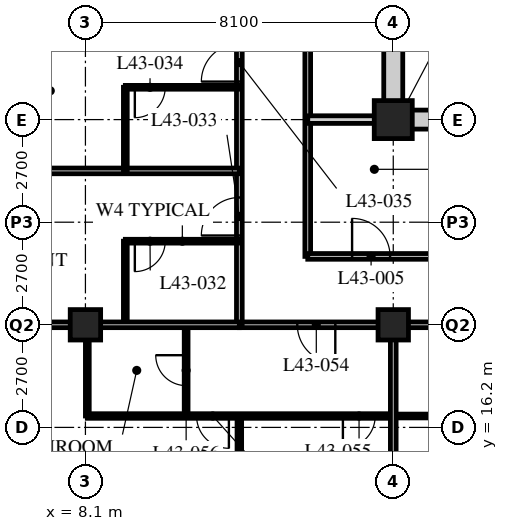
"""IFC4 building model, lengths in metres.
Left out: names, types, materials, properties, quantities, classifications, styles, units other than length and angle.
Written with IfcOpenShell. Run it as: python <this file> out.ifc"""

import sys

from ifc_helpers import new_model, si_unit, direction, frame, frame_2d, origin, origin_2d, place, context, subcontext, project, spatial, rectangle, hollow_rectangle, extrude, element, fill, save


model = new_model("IFC4")
c1 = context("Model", 3, precision=1e-05, world=origin(), true_north=direction((0.0, 1.0)))
c2 = subcontext(c1, "Body", "Model", "MODEL_VIEW")
j1 = project(units=[si_unit("LENGTHUNIT", "METRE"), si_unit("PLANEANGLEUNIT", "RADIAN")], contexts=[c1])
p1 = place(None, origin())
s1 = spatial("IfcSite", under=j1, at=p1, CompositionType="ELEMENT")
p2 = place(p1, origin())
s2 = spatial("IfcBuilding", under=s1, at=p2, CompositionType="ELEMENT")
p3 = place(p2, frame((0.0, 0.0, 170.4)))
s3 = spatial("IfcBuildingStorey", under=s2, at=p3, CompositionType="ELEMENT", Elevation=170.4)
for number, where, z_axis, x_axis in (
    (1, (8.1, 18.9, 0.0), (0.0, 0.0, 1.0), (1.0, 0.0, 0.0)),
    (2, (16.2, 18.9, 0.0), (0.0, 0.0, 1.0), (1.0, 0.0, 0.0)),
):
    element("IfcColumn", number, at=place(p3, frame(where, z_axis=z_axis, x_axis=x_axis)), inside=s3, PredefinedType="COLUMN", context=c2, shape_type="SweptSolid", body=[
        extrude(hollow_rectangle(XDim=0.8, YDim=0.8, WallThickness=0.08, at=origin_2d()), origin(), (0.0, 0.0, 1.0), 3.6),
    ])
p4 = place(p3, frame((16.2, 24.3, 0.0), z_axis=(0.0, 0.0, 1.0), x_axis=(1.0, 0.0, 0.0)))
e3 = element("IfcColumn", 3, at=p4, inside=s3, PredefinedType="COLUMN", context=c2, shape_type="SweptSolid", body=[
    extrude(hollow_rectangle(XDim=1.0, YDim=1.0, WallThickness=0.1, at=origin_2d()), origin(), (0.0, 0.0, 1.0), 3.6),
])
p5 = place(p3, frame((12.15, 18.9, 0.0), z_axis=(0.0, 0.0, 1.0), x_axis=(1.0, 0.0, 0.0)))
e4 = element("IfcWall", 4, at=p5, inside=s3, PredefinedType="PARTITIONING", context=c2, shape_type="SweptSolid", body=[
    extrude(rectangle(XDim=32.4, YDim=0.15, at=frame_2d((16.2, 0.0))), origin(), (0.0, 0.0, 1.0), 2.778),
])
p6 = place(p5, frame((6.4, 0.0, 0.0)))
e5 = element("IfcOpeningElement", 5, at=p6, cuts=e4, PredefinedType="OPENING", context=c2, shape_type="SweptSolid", body=[
    extrude(rectangle(XDim=1.0, YDim=2.1, at=frame_2d((0.5, 1.05))), frame((0.0, 0.085, 0.0), z_axis=(0.0, -1.0, 0.0), x_axis=(1.0, 0.0, 0.0)), (0.0, 0.0, 1.0), 0.17),
])
p7 = place(p5, frame((8.8, 0.0, 0.0)))
e6 = element("IfcOpeningElement", 6, at=p7, cuts=e4, PredefinedType="OPENING", context=c2, shape_type="SweptSolid", body=[
    extrude(rectangle(XDim=1.0, YDim=2.1, at=frame_2d((0.5, 1.05))), frame((0.0, 0.085, 0.0), z_axis=(0.0, -1.0, 0.0), x_axis=(1.0, 0.0, 0.0)), (0.0, 0.0, 1.0), 0.17),
])
p8 = place(p5, frame((13.05, 0.0, 0.0)))
e7 = element("IfcOpeningElement", 7, at=p8, cuts=e4, PredefinedType="OPENING", context=c2, shape_type="SweptSolid", body=[
    extrude(rectangle(XDim=1.0, YDim=2.1, at=frame_2d((0.5, 1.05))), frame((0.0, 0.085, 0.0), z_axis=(0.0, -1.0, 0.0), x_axis=(1.0, 0.0, 0.0)), (0.0, 0.0, 1.0), 0.17),
])
p9 = place(p5, frame((22.6, 0.0, 0.0)))
e8 = element("IfcOpeningElement", 8, at=p9, cuts=e4, PredefinedType="OPENING", context=c2, shape_type="SweptSolid", body=[
    extrude(rectangle(XDim=1.0, YDim=2.1, at=frame_2d((0.5, 1.05))), frame((0.0, 0.085, 0.0), z_axis=(0.0, -1.0, 0.0), x_axis=(1.0, 0.0, 0.0)), (0.0, 0.0, 1.0), 0.17),
])
p10 = place(p5, frame((25.0, 0.0, 0.0)))
e9 = element("IfcOpeningElement", 9, at=p10, cuts=e4, PredefinedType="OPENING", context=c2, shape_type="SweptSolid", body=[
    extrude(rectangle(XDim=1.0, YDim=2.1, at=frame_2d((0.5, 1.05))), frame((0.0, 0.085, 0.0), z_axis=(0.0, -1.0, 0.0), x_axis=(1.0, 0.0, 0.0)), (0.0, 0.0, 1.0), 0.17),
])
p11 = place(p5, frame((1.525, 0.0, 0.0)))
e10 = element("IfcOpeningElement", 10, at=p11, cuts=e4, PredefinedType="OPENING", context=c2, shape_type="SweptSolid", body=[
    extrude(rectangle(XDim=1.0, YDim=2.1, at=frame_2d((0.5, 1.05))), frame((0.0, 0.085, 0.0), z_axis=(0.0, -1.0, 0.0), x_axis=(1.0, 0.0, 0.0)), (0.0, 0.0, 1.0), 0.17),
])
p12 = place(p5, frame((29.875, 0.0, 0.0)))
e11 = element("IfcOpeningElement", 11, at=p12, cuts=e4, PredefinedType="OPENING", context=c2, shape_type="SweptSolid", body=[
    extrude(rectangle(XDim=1.0, YDim=2.1, at=frame_2d((0.5, 1.05))), frame((0.0, 0.085, 0.0), z_axis=(0.0, -1.0, 0.0), x_axis=(1.0, 0.0, 0.0)), (0.0, 0.0, 1.0), 0.17),
])
p13 = place(p3, frame((12.15, 18.9, 0.0), z_axis=(0.0, 0.0, 1.0), x_axis=(0.0, 1.0, 0.0)))
e12 = element("IfcWall", 12, at=p13, inside=s3, PredefinedType="PARTITIONING", context=c2, shape_type="SweptSolid", body=[
    extrude(rectangle(XDim=24.3, YDim=0.15, at=frame_2d((12.15, 0.0))), origin(), (0.0, 0.0, 1.0), 3.39),
])
p14 = place(p13, frame((2.35, 0.0, 0.0)))
e13 = element("IfcOpeningElement", 13, at=p14, cuts=e12, PredefinedType="OPENING", context=c2, shape_type="SweptSolid", body=[
    extrude(rectangle(XDim=1.0, YDim=2.1, at=frame_2d((0.5, 1.05))), frame((0.0, 0.085, 0.0), z_axis=(0.0, -1.0, 0.0), x_axis=(1.0, 0.0, 0.0)), (0.0, 0.0, 1.0), 0.17),
])
p15 = place(p13, frame((6.4, 0.0, 0.0)))
e14 = element("IfcOpeningElement", 14, at=p15, cuts=e12, PredefinedType="OPENING", context=c2, shape_type="SweptSolid", body=[
    extrude(rectangle(XDim=1.0, YDim=2.1, at=frame_2d((0.5, 1.05))), frame((0.0, 0.085, 0.0), z_axis=(0.0, -1.0, 0.0), x_axis=(1.0, 0.0, 0.0)), (0.0, 0.0, 1.0), 0.17),
])
p16 = place(p13, frame((8.5, 0.0, 0.0)))
e15 = element("IfcOpeningElement", 15, at=p16, cuts=e12, PredefinedType="OPENING", context=c2, shape_type="SweptSolid", body=[
    extrude(rectangle(XDim=1.0, YDim=2.1, at=frame_2d((0.5, 1.05))), frame((0.0, 0.085, 0.0), z_axis=(0.0, -1.0, 0.0), x_axis=(1.0, 0.0, 0.0)), (0.0, 0.0, 1.0), 0.17),
])
p17 = place(p13, frame((16.6, 0.0, 0.0)))
e16 = element("IfcOpeningElement", 16, at=p17, cuts=e12, PredefinedType="OPENING", context=c2, shape_type="SweptSolid", body=[
    extrude(rectangle(XDim=1.0, YDim=2.1, at=frame_2d((0.5, 1.05))), frame((0.0, 0.085, 0.0), z_axis=(0.0, -1.0, 0.0), x_axis=(1.0, 0.0, 0.0)), (0.0, 0.0, 1.0), 0.17),
])
p18 = place(p3, frame((13.95, 40.5, 0.0), z_axis=(0.0, 0.0, 1.0), x_axis=(0.0, -1.0, 0.0)))
e17 = element("IfcWall", 17, at=p18, inside=s3, PredefinedType="PARTITIONING", context=c2, shape_type="SweptSolid", body=[
    extrude(rectangle(XDim=19.8, YDim=0.15, at=frame_2d((9.9, 0.0))), origin(), (0.0, 0.0, 1.0), 3.39),
])
p19 = place(p18, frame((11.65, 0.0, 0.0)))
e18 = element("IfcOpeningElement", 18, at=p19, cuts=e17, PredefinedType="OPENING", context=c2, shape_type="SweptSolid", body=[
    extrude(rectangle(XDim=1.0, YDim=2.1, at=frame_2d((0.5, 1.05))), frame((0.0, 0.085, 0.0), z_axis=(0.0, -1.0, 0.0), x_axis=(1.0, 0.0, 0.0)), (0.0, 0.0, 1.0), 0.17),
])
p20 = place(p18, frame((3.55, 0.0, 0.0)))
e19 = element("IfcOpeningElement", 19, at=p20, cuts=e17, PredefinedType="OPENING", context=c2, shape_type="SweptSolid", body=[
    extrude(rectangle(XDim=1.0, YDim=2.1, at=frame_2d((0.5, 1.05))), frame((0.0, 0.085, 0.0), z_axis=(0.0, -1.0, 0.0), x_axis=(1.0, 0.0, 0.0)), (0.0, 0.0, 1.0), 0.17),
])
p21 = place(p3, frame((13.95, 20.7, 0.0), z_axis=(0.0, 0.0, 1.0), x_axis=(1.0, 0.0, 0.0)))
e20 = element("IfcWall", 20, at=p21, inside=s3, PredefinedType="PARTITIONING", context=c2, shape_type="SweptSolid", body=[
    extrude(rectangle(XDim=13.19, YDim=0.15, at=frame_2d((6.595, 0.0))), origin(), (0.0, 0.0, 1.0), 3.39),
])
p22 = place(p21, frame((1.167, 0.0, 0.0)))
e21 = element("IfcOpeningElement", 21, at=p22, cuts=e20, PredefinedType="OPENING", context=c2, shape_type="SweptSolid", body=[
    extrude(rectangle(XDim=1.0, YDim=2.1, at=frame_2d((0.5, 1.05))), frame((0.0, 0.085, 0.0), z_axis=(0.0, -1.0, 0.0), x_axis=(1.0, 0.0, 0.0)), (0.0, 0.0, 1.0), 0.17),
])
p23 = place(p21, frame((7.767, 0.0, 0.0)))
e22 = element("IfcOpeningElement", 22, at=p23, cuts=e20, PredefinedType="OPENING", context=c2, shape_type="SweptSolid", body=[
    extrude(rectangle(XDim=1.0, YDim=2.1, at=frame_2d((0.5, 1.05))), frame((0.0, 0.085, 0.0), z_axis=(0.0, -1.0, 0.0), x_axis=(1.0, 0.0, 0.0)), (0.0, 0.0, 1.0), 0.17),
])
p24 = place(p3, frame((13.95, 24.3, 0.0), z_axis=(0.0, 0.0, 1.0), x_axis=(1.0, 0.0, 0.0)))
e23 = element("IfcWall", 23, at=p24, inside=s3, PredefinedType="SOLIDWALL", context=c2, shape_type="SweptSolid", body=[
    extrude(rectangle(XDim=2.25, YDim=0.2, at=frame_2d((1.125, 0.0))), origin(), (0.0, 0.0, 1.0), 3.39),
])
p25 = place(p3, frame((16.2, 16.5, 0.0), z_axis=(0.0, 0.0, 1.0), x_axis=(1.0, 0.0, 0.0)))
e24 = element("IfcWall", 24, at=p25, inside=s3, PredefinedType="PARTITIONING", context=c2, shape_type="SweptSolid", body=[
    extrude(rectangle(XDim=2.2, YDim=0.1, at=frame_2d((1.1, 0.0))), origin(), (0.0, 0.0, 1.0), 3.39),
])
p26 = place(p3, frame((9.15, 18.9, 0.0), z_axis=(0.0, 0.0, 1.0), x_axis=(0.0, 1.0, 0.0)))
e25 = element("IfcWall", 25, at=p26, inside=s3, PredefinedType="PARTITIONING", context=c2, shape_type="SweptSolid", body=[
    extrude(rectangle(XDim=2.2, YDim=0.1, at=frame_2d((1.1, 0.0))), origin(), (0.0, 0.0, 1.0), 3.39),
])
p27 = place(p3, frame((12.15, 21.1, 0.0), z_axis=(0.0, 0.0, 1.0), x_axis=(-1.0, 0.0, 0.0)))
e26 = element("IfcWall", 26, at=p27, inside=s3, PredefinedType="PARTITIONING", context=c2, shape_type="SweptSolid", body=[
    extrude(rectangle(XDim=3.0, YDim=0.1, at=frame_2d((1.5, 0.0))), origin(), (0.0, 0.0, 1.0), 3.39),
])
p28 = place(p27, frame((1.95, 0.0, 0.0)))
e27 = element("IfcOpeningElement", 27, at=p28, cuts=e26, PredefinedType="OPENING", context=c2, shape_type="SweptSolid", body=[
    extrude(rectangle(XDim=0.8, YDim=2.1, at=frame_2d((0.4, 1.05))), frame((0.0, 0.06, 0.0), z_axis=(0.0, -1.0, 0.0), x_axis=(1.0, 0.0, 0.0)), (0.0, 0.0, 1.0), 0.12),
])
p29 = place(p3, frame((12.15, 22.95, 0.0), z_axis=(0.0, 0.0, 1.0), x_axis=(-1.0, 0.0, 0.0)))
e28 = element("IfcWall", 28, at=p29, inside=s3, PredefinedType="PARTITIONING", context=c2, shape_type="SweptSolid", body=[
    extrude(rectangle(XDim=11.85, YDim=0.15, at=frame_2d((5.925, 0.0))), origin(), (0.0, 0.0, 1.0), 3.39),
])
p30 = place(p3, frame((9.15, 22.95, 0.0), z_axis=(0.0, 0.0, 1.0), x_axis=(0.0, 1.0, 0.0)))
e29 = element("IfcWall", 29, at=p30, inside=s3, PredefinedType="PARTITIONING", context=c2, shape_type="SweptSolid", body=[
    extrude(rectangle(XDim=2.2, YDim=0.1, at=frame_2d((1.1, 0.0))), origin(), (0.0, 0.0, 1.0), 3.39),
])
p31 = place(p3, frame((12.15, 25.15, 0.0), z_axis=(0.0, 0.0, 1.0), x_axis=(-1.0, 0.0, 0.0)))
e30 = element("IfcWall", 30, at=p31, inside=s3, PredefinedType="PARTITIONING", context=c2, shape_type="SweptSolid", body=[
    extrude(rectangle(XDim=3.0, YDim=0.1, at=frame_2d((1.5, 0.0))), origin(), (0.0, 0.0, 1.0), 3.39),
])
p32 = place(p31, frame((1.95, 0.0, 0.0)))
e31 = element("IfcOpeningElement", 31, at=p32, cuts=e30, PredefinedType="OPENING", context=c2, shape_type="SweptSolid", body=[
    extrude(rectangle(XDim=0.8, YDim=2.1, at=frame_2d((0.4, 1.05))), frame((0.0, 0.06, 0.0), z_axis=(0.0, -1.0, 0.0), x_axis=(1.0, 0.0, 0.0)), (0.0, 0.0, 1.0), 0.12),
])
p33 = place(p3, frame((10.75, 18.9, 0.0), z_axis=(0.0, 0.0, 1.0), x_axis=(0.0, -1.0, 0.0)))
e32 = element("IfcWall", 32, at=p33, inside=s3, PredefinedType="PARTITIONING", context=c2, shape_type="SweptSolid", body=[
    extrude(rectangle(XDim=2.4, YDim=0.1, at=frame_2d((1.2, 0.0))), origin(), (0.0, 0.0, 1.0), 3.39),
])
p34 = place(p33, frame((0.8, 0.0, 0.0)))
e33 = element("IfcOpeningElement", 33, at=p34, cuts=e32, PredefinedType="OPENING", context=c2, shape_type="SweptSolid", body=[
    extrude(rectangle(XDim=0.8, YDim=2.1, at=frame_2d((0.4, 1.05))), frame((0.0, 0.06, 0.0), z_axis=(0.0, -1.0, 0.0), x_axis=(1.0, 0.0, 0.0)), (0.0, 0.0, 1.0), 0.12),
])
p35 = place(p3, frame((8.15, 18.9, 0.0), z_axis=(0.0, 0.0, 1.0), x_axis=(0.0, -1.0, 0.0)))
e34 = element("IfcWall", 34, at=p35, inside=s3, PredefinedType="PARTITIONING", context=c2, shape_type="SweptSolid", body=[
    extrude(rectangle(XDim=2.4, YDim=0.1, at=frame_2d((1.2, 0.0))), origin(), (0.0, 0.0, 1.0), 2.778),
])
p36 = place(p3, frame((8.15, 16.5, 0.0), z_axis=(0.0, 0.0, 1.0), x_axis=(1.0, 0.0, 0.0)))
e35 = element("IfcWall", 35, at=p36, inside=s3, PredefinedType="PARTITIONING", context=c2, shape_type="SweptSolid", body=[
    extrude(rectangle(XDim=8.05, YDim=0.12, at=frame_2d((4.025, 0.0))), origin(), (0.0, 0.0, 1.0), 3.39),
])
p37 = place(p36, frame((6.725, 0.0, 0.0)))
e36 = element("IfcOpeningElement", 36, at=p37, cuts=e35, PredefinedType="OPENING", context=c2, shape_type="SweptSolid", body=[
    extrude(rectangle(XDim=0.85, YDim=2.1, at=frame_2d((0.425, 1.05))), frame((0.0, 0.07, 0.0), z_axis=(0.0, -1.0, 0.0), x_axis=(1.0, 0.0, 0.0)), (0.0, 0.0, 1.0), 0.14),
])
p38 = place(p36, frame((2.875, 0.0, 0.0)))
e37 = element("IfcOpeningElement", 37, at=p38, cuts=e35, PredefinedType="OPENING", context=c2, shape_type="SweptSolid", body=[
    extrude(rectangle(XDim=0.85, YDim=2.1, at=frame_2d((0.425, 1.05))), frame((0.0, 0.07, 0.0), z_axis=(0.0, -1.0, 0.0), x_axis=(1.0, 0.0, 0.0)), (0.0, 0.0, 1.0), 0.14),
])
p39 = place(p3, frame((12.15, 16.5, 0.0), z_axis=(0.0, 0.0, 1.0), x_axis=(0.0, -1.0, 0.0)))
e38 = element("IfcWall", 38, at=p39, inside=s3, PredefinedType="PARTITIONING", context=c2, shape_type="SweptSolid", body=[
    extrude(rectangle(XDim=5.4, YDim=0.12, at=frame_2d((2.7, 0.0))), origin(), (0.0, 0.0, 1.0), 3.39),
])
for number, where, z_axis, x_axis in (
    (39, (4.35, 18.9, 0.0), (0.0, 0.0, 1.0), (1.0, 0.0, 0.0)),
    (40, (16.2, 18.9, 0.0), (0.0, 0.0, 1.0), (0.0, -1.0, 0.0)),
):
    element("IfcWall", number, at=place(p3, frame(where, z_axis=z_axis, x_axis=x_axis)), inside=s3, PredefinedType="PARTITIONING", context=c2, shape_type="SweptSolid", body=[
        extrude(rectangle(XDim=7.8, YDim=0.15, at=frame_2d((3.9, 0.0))), origin(), (0.0, 0.0, 1.0), 2.778),
    ])
p40 = place(p3, frame((15.95, 24.3, 0.0), z_axis=(0.0, 0.0, 1.0), x_axis=(1.0, 0.0, 0.0)))
e41 = element("IfcWall", 41, at=p40, inside=s3, PredefinedType="SOLIDWALL", context=c2, shape_type="SweptSolid", body=[
    extrude(rectangle(XDim=24.8, YDim=0.5, at=frame_2d((12.4, 0.0))), origin(), (0.0, 0.0, 1.0), 2.74),
])
p41 = place(p40, frame((11.5, 0.0, 0.0)))
e42 = element("IfcOpeningElement", 42, at=p41, cuts=e41, PredefinedType="OPENING", context=c2, shape_type="SweptSolid", body=[
    extrude(rectangle(XDim=1.8, YDim=2.4, at=frame_2d((0.9, 1.2))), frame((0.0, 0.26, 0.0), z_axis=(0.0, -1.0, 0.0), x_axis=(1.0, 0.0, 0.0)), (0.0, 0.0, 1.0), 0.52),
])
p42 = place(p3, frame((16.2, 24.55, 0.0), z_axis=(0.0, 0.0, 1.0), x_axis=(0.0, 1.0, 0.0)))
e43 = element("IfcWall", 43, at=p42, inside=s3, PredefinedType="SOLIDWALL", context=c2, shape_type="SweptSolid", body=[
    extrude(rectangle(XDim=15.7, YDim=0.5, at=frame_2d((7.85, 0.0))), origin(), (0.0, 0.0, 1.0), 2.778),
])
p43 = place(p22, origin())
e44 = element("IfcDoor", 44, at=p43, inside=s3, OperationType="SINGLE_SWING_LEFT", PredefinedType="DOOR", context=c2, shape_type="SweptSolid", body=[
    extrude(rectangle(XDim=1.0, YDim=2.1, at=frame_2d((0.5, 1.05))), frame((0.0, 0.025, 0.0), z_axis=(0.0, -1.0, 0.0), x_axis=(1.0, 0.0, 0.0)), (0.0, 0.0, 1.0), 0.05),
])
fill(e21, e44)
p44 = place(p28, origin())
e45 = element("IfcDoor", 45, at=p44, inside=s3, OperationType="SINGLE_SWING_RIGHT", PredefinedType="DOOR", context=c2, shape_type="SweptSolid", body=[
    extrude(rectangle(XDim=0.8, YDim=2.1, at=frame_2d((0.4, 1.05))), frame((0.0, 0.025, 0.0), z_axis=(0.0, -1.0, 0.0), x_axis=(1.0, 0.0, 0.0)), (0.0, 0.0, 1.0), 0.05),
])
fill(e27, e45)
p45 = place(p14, origin())
e46 = element("IfcDoor", 46, at=p45, inside=s3, OperationType="SINGLE_SWING_LEFT", PredefinedType="DOOR", context=c2, shape_type="SweptSolid", body=[
    extrude(rectangle(XDim=1.0, YDim=2.1, at=frame_2d((0.5, 1.05))), frame((0.0, 0.025, 0.0), z_axis=(0.0, -1.0, 0.0), x_axis=(1.0, 0.0, 0.0)), (0.0, 0.0, 1.0), 0.05),
])
fill(e13, e46)
p46 = place(p32, origin())
e47 = element("IfcDoor", 47, at=p46, inside=s3, OperationType="SINGLE_SWING_RIGHT", PredefinedType="DOOR", context=c2, shape_type="SweptSolid", body=[
    extrude(rectangle(XDim=0.8, YDim=2.1, at=frame_2d((0.4, 1.05))), frame((0.0, 0.025, 0.0), z_axis=(0.0, -1.0, 0.0), x_axis=(1.0, 0.0, 0.0)), (0.0, 0.0, 1.0), 0.05),
])
fill(e31, e47)
p47 = place(p15, origin())
e48 = element("IfcDoor", 48, at=p47, inside=s3, OperationType="SINGLE_SWING_LEFT", PredefinedType="DOOR", context=c2, shape_type="SweptSolid", body=[
    extrude(rectangle(XDim=1.0, YDim=2.1, at=frame_2d((0.5, 1.05))), frame((0.0, 0.025, 0.0), z_axis=(0.0, -1.0, 0.0), x_axis=(1.0, 0.0, 0.0)), (0.0, 0.0, 1.0), 0.05),
])
fill(e14, e48)
p48 = place(p11, origin())
e49 = element("IfcDoor", 49, at=p48, inside=s3, OperationType="SINGLE_SWING_LEFT", PredefinedType="DOOR", context=c2, shape_type="SweptSolid", body=[
    extrude(rectangle(XDim=1.0, YDim=2.1, at=frame_2d((0.5, 1.05))), frame((0.0, 0.025, 0.0), z_axis=(0.0, -1.0, 0.0), x_axis=(1.0, 0.0, 0.0)), (0.0, 0.0, 1.0), 0.05),
])
fill(e10, e49)
p49 = place(p37, origin())
e50 = element("IfcDoor", 50, at=p49, inside=s3, OperationType="SINGLE_SWING_RIGHT", PredefinedType="DOOR", context=c2, shape_type="SweptSolid", body=[
    extrude(rectangle(XDim=0.85, YDim=2.1, at=frame_2d((0.425, 1.05))), frame((0.0, 0.025, 0.0), z_axis=(0.0, -1.0, 0.0), x_axis=(1.0, 0.0, 0.0)), (0.0, 0.0, 1.0), 0.05),
])
fill(e36, e50)
p50 = place(p34, origin())
e51 = element("IfcDoor", 51, at=p50, inside=s3, OperationType="SINGLE_SWING_RIGHT", PredefinedType="DOOR", context=c2, shape_type="SweptSolid", body=[
    extrude(rectangle(XDim=0.8, YDim=2.1, at=frame_2d((0.4, 1.05))), frame((0.0, 0.025, 0.0), z_axis=(0.0, -1.0, 0.0), x_axis=(1.0, 0.0, 0.0)), (0.0, 0.0, 1.0), 0.05),
])
fill(e33, e51)
p51 = place(p38, origin())
e52 = element("IfcDoor", 52, at=p51, inside=s3, OperationType="SINGLE_SWING_LEFT", PredefinedType="DOOR", context=c2, shape_type="SweptSolid", body=[
    extrude(rectangle(XDim=0.85, YDim=2.1, at=frame_2d((0.425, 1.05))), frame((0.0, 0.025, 0.0), z_axis=(0.0, -1.0, 0.0), x_axis=(1.0, 0.0, 0.0)), (0.0, 0.0, 1.0), 0.05),
])
fill(e37, e52)
save(model, sys.argv[1])
